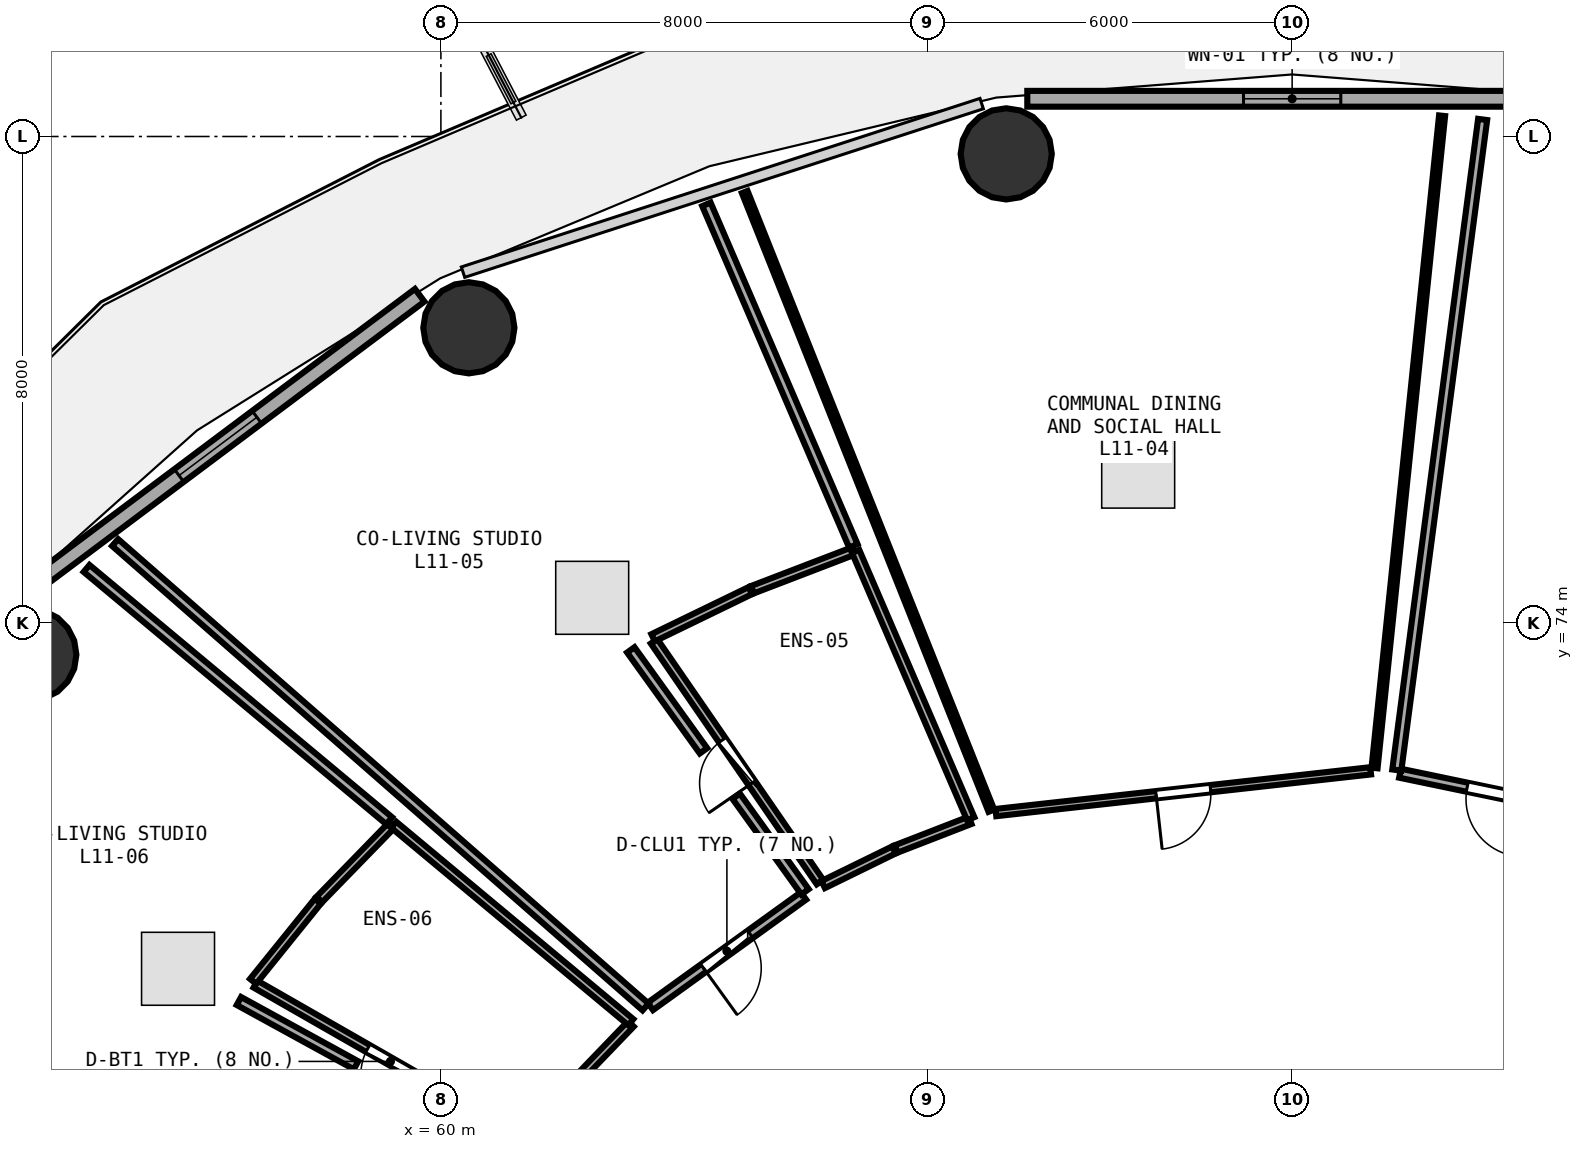
"""IFC4 building model, lengths in metres.
Left out: names, types, materials, properties, quantities, classifications, styles, units other than length and angle.
Written with IfcOpenShell. Run it as: python <this file> out.ifc"""

import sys

from ifc_helpers import new_model, si_unit, direction, frame, frame_2d, origin, origin_2d, place, context, subcontext, project, spatial, rectangle, circle, extrude, element, fill, save


model = new_model("IFC4")
c1 = context("Model", 3, precision=1e-05, world=origin(), true_north=direction((0.0, 1.0)))
c2 = subcontext(c1, "Body", "Model", "MODEL_VIEW")
j1 = project(units=[si_unit("LENGTHUNIT", "METRE"), si_unit("PLANEANGLEUNIT", "RADIAN")], contexts=[c1])
p1 = place(None, origin())
s1 = spatial("IfcSite", under=j1, at=p1, CompositionType="ELEMENT")
p2 = place(p1, origin())
s2 = spatial("IfcBuilding", under=s1, at=p2, CompositionType="ELEMENT")
p3 = place(p2, frame((0.0, 0.0, 45.0)))
s3 = spatial("IfcBuildingStorey", under=s2, at=p3, CompositionType="ELEMENT", Elevation=45.0)
for number, where, z_axis, x_axis in (
    (1, (69.298, 81.714, 0.0), (0.0, 0.0, 1.0), (1.0, 0.0, 0.0)),
    (2, (60.46, 78.854, 0.0), (0.0, 0.0, 1.0), (1.0, 0.0, 0.0)),
    (3, (53.256, 73.478, 0.0), (0.0, 0.0, 1.0), (1.0, 0.0, 0.0)),
):
    element("IfcColumn", number, at=place(p3, frame(where, z_axis=z_axis, x_axis=x_axis)), inside=s3, PredefinedType="COLUMN", context=c2, shape_type="SweptSolid", body=[
        extrude(circle(Radius=0.75, at=origin_2d()), origin(), (0.0, 0.0, 1.0), 3.75),
    ])
p4 = place(p3, frame((78.356, 82.62, 0.0), z_axis=(0.0, 0.0, 1.0), x_axis=(-1.0, 0.0, 0.0)))
e4 = element("IfcWall", 4, at=p4, inside=s3, PredefinedType="SOLIDWALL", context=c2, shape_type="SweptSolid", body=[
    extrude(rectangle(XDim=8.712, YDim=0.26, at=frame_2d((4.356, 0.0))), origin(), (0.0, 0.0, 1.0), 3.475),
])
p5 = place(p4, frame((3.556, 0.0, 0.85)))
e5 = element("IfcOpeningElement", 5, at=p5, cuts=e4, PredefinedType="OPENING", context=c2, shape_type="SweptSolid", body=[
    extrude(rectangle(XDim=1.6, YDim=1.45, at=frame_2d((0.8, 0.725))), frame((0.0, 0.14, 0.0), z_axis=(0.0, -1.0, 0.0), x_axis=(1.0, 0.0, 0.0)), (0.0, 0.0, 1.0), 0.28),
])
p6 = place(p3, frame((59.651, 79.389, 0.0), z_axis=(0.0, 0.0, 1.0), x_axis=(-0.80030733173, -0.599590005569, 0.0)))
e6 = element("IfcWall", 6, at=p6, inside=s3, PredefinedType="SOLIDWALL", context=c2, shape_type="SweptSolid", body=[
    extrude(rectangle(XDim=8.291, YDim=0.26, at=frame_2d((4.145, 0.0))), origin(), (0.0, 0.0, 1.0), 3.475),
])
p7 = place(p6, frame((3.345, 0.0, 0.85)))
e7 = element("IfcOpeningElement", 7, at=p7, cuts=e6, PredefinedType="OPENING", context=c2, shape_type="SweptSolid", body=[
    extrude(rectangle(XDim=1.6, YDim=1.45, at=frame_2d((0.8, 0.725))), frame((0.0, 0.14, 0.0), z_axis=(0.0, -1.0, 0.0), x_axis=(1.0, 0.0, 0.0)), (0.0, 0.0, 1.0), 0.28),
])
p8 = place(p3, frame((78.914, 70.874, 0.0), z_axis=(0.0, 0.0, 1.0), x_axis=(-0.978952544969, 0.204088007237, 0.0)))
e8 = element("IfcWall", 8, at=p8, inside=s3, PredefinedType="PARTITIONING", context=c2, shape_type="SweptSolid", body=[
    extrude(rectangle(XDim=3.207, YDim=0.15, at=frame_2d((1.604, 0.0))), origin(), (0.0, 0.0, 1.0), 3.235),
])
p9 = place(p8, frame((1.129, 0.0, 0.0)))
e9 = element("IfcOpeningElement", 9, at=p9, cuts=e8, PredefinedType="OPENING", context=c2, shape_type="SweptSolid", body=[
    extrude(rectangle(XDim=0.95, YDim=2.08, at=frame_2d((0.475, 1.04))), frame((0.0, 0.085, 0.0), z_axis=(0.0, -1.0, 0.0), x_axis=(1.0, 0.0, 0.0)), (0.0, 0.0, 1.0), 0.17),
])
p10 = place(p3, frame((75.292, 71.568, 0.0), z_axis=(0.0, 0.0, 1.0), x_axis=(-0.993850084324, -0.110733959964, 0.0)))
e10 = element("IfcWall", 10, at=p10, inside=s3, PredefinedType="PARTITIONING", context=c2, shape_type="SweptSolid", body=[
    extrude(rectangle(XDim=6.202, YDim=0.12, at=frame_2d((3.101, 0.0))), origin(), (0.0, 0.0, 1.0), 2.875),
])
p11 = place(p10, frame((2.651, 0.0, 0.0)))
e11 = element("IfcOpeningElement", 11, at=p11, cuts=e10, PredefinedType="OPENING", context=c2, shape_type="SweptSolid", body=[
    extrude(rectangle(XDim=0.9, YDim=2.08, at=frame_2d((0.45, 1.04))), frame((0.0, 0.07, 0.0), z_axis=(0.0, -1.0, 0.0), x_axis=(1.0, 0.0, 0.0)), (0.0, 0.0, 1.0), 0.14),
])
p12 = place(p3, frame((66.235, 69.738, 0.0), z_axis=(0.0, 0.0, 1.0), x_axis=(-0.567426867042, 0.823423797664, 0.0)))
e12 = element("IfcWall", 12, at=p12, inside=s3, PredefinedType="PLUMBINGWALL", context=c2, shape_type="SweptSolid", body=[
    extrude(rectangle(XDim=4.809, YDim=0.13, at=frame_2d((2.405, 0.0))), origin(), (0.0, 0.0, 1.0), 3.175),
])
p13 = place(p12, frame((1.975, 0.0, 0.0)))
e13 = element("IfcOpeningElement", 13, at=p13, cuts=e12, PredefinedType="OPENING", context=c2, shape_type="SweptSolid", body=[
    extrude(rectangle(XDim=0.86, YDim=2.05, at=frame_2d((0.43, 1.025))), frame((0.0, 0.075, 0.0), z_axis=(0.0, -1.0, 0.0), x_axis=(1.0, 0.0, 0.0)), (0.0, 0.0, 1.0), 0.15),
])
p14 = place(p3, frame((65.963, 69.511, 0.0), z_axis=(0.0, 0.0, 1.0), x_axis=(-0.811021116066, -0.585016879496, 0.0)))
e14 = element("IfcWall", 14, at=p14, inside=s3, PredefinedType="PARTITIONING", context=c2, shape_type="SweptSolid", body=[
    extrude(rectangle(XDim=3.106, YDim=0.15, at=frame_2d((1.553, 0.0))), origin(), (0.0, 0.0, 1.0), 2.875),
])
p15 = place(p14, frame((1.078, 0.0, 0.0)))
e15 = element("IfcOpeningElement", 15, at=p15, cuts=e14, PredefinedType="OPENING", context=c2, shape_type="SweptSolid", body=[
    extrude(rectangle(XDim=0.95, YDim=2.08, at=frame_2d((0.475, 1.04))), frame((0.0, 0.085, 0.0), z_axis=(0.0, -1.0, 0.0), x_axis=(1.0, 0.0, 0.0)), (0.0, 0.0, 1.0), 0.17),
])
p16 = place(p3, frame((61.39, 65.519, 0.0), z_axis=(0.0, 0.0, 1.0), x_axis=(-0.867813964862, 0.496889245598, 0.0)))
e16 = element("IfcWall", 16, at=p16, inside=s3, PredefinedType="PLUMBINGWALL", context=c2, shape_type="SweptSolid", body=[
    extrude(rectangle(XDim=5.115, YDim=0.13, at=frame_2d((2.557, 0.0))), origin(), (0.0, 0.0, 1.0), 2.875),
])
p17 = place(p16, frame((2.127, 0.0, 0.0)))
e17 = element("IfcOpeningElement", 17, at=p17, cuts=e16, PredefinedType="OPENING", context=c2, shape_type="SweptSolid", body=[
    extrude(rectangle(XDim=0.86, YDim=2.05, at=frame_2d((0.43, 1.025))), frame((0.0, 0.075, 0.0), z_axis=(0.0, -1.0, 0.0), x_axis=(1.0, 0.0, 0.0)), (0.0, 0.0, 1.0), 0.15),
])
p18 = place(p3, frame((75.721, 71.581, 0.0), z_axis=(0.0, 0.0, 1.0), x_axis=(0.130800348515, 0.991408729449, 0.0)))
e18 = element("IfcWall", 18, at=p18, inside=s3, PredefinedType="PARTITIONING", context=c2, shape_type="SweptSolid", body=[
    extrude(rectangle(XDim=10.792, YDim=0.15, at=frame_2d((5.396, 0.0))), origin(), (0.0, 0.0, 1.0), 2.875),
])
p19 = place(p3, frame((69.053, 70.912, 0.0), z_axis=(0.0, 0.0, 1.0), x_axis=(-0.370325956987, 0.928901870803, 0.0)))
e19 = element("IfcWall", 19, at=p19, inside=s3, PredefinedType="PARTITIONING", context=c2, shape_type="SweptSolid", body=[
    extrude(rectangle(XDim=10.954, YDim=0.1, at=frame_2d((5.477, 0.0))), origin(), (0.0, 0.0, 1.0), 2.875),
])
p20 = place(p3, frame((76.466, 82.341, 0.0), z_axis=(0.0, 0.0, 1.0), x_axis=(-0.103008831227, -0.994680441493, 0.0)))
e20 = element("IfcWall", 20, at=p20, inside=s3, PredefinedType="PARTITIONING", context=c2, shape_type="SweptSolid", body=[
    extrude(rectangle(XDim=10.784, YDim=0.1, at=frame_2d((5.392, 0.0))), origin(), (0.0, 0.0, 1.0), 2.875),
])
p21 = place(p3, frame((68.703, 70.755, 0.0), z_axis=(0.0, 0.0, 1.0), x_axis=(-0.932299479839, -0.361687268082, 0.0)))
e21 = element("IfcWall", 21, at=p21, inside=s3, PredefinedType="PLUMBINGWALL", context=c2, shape_type="SweptSolid", body=[
    extrude(rectangle(XDim=1.304, YDim=0.13, at=frame_2d((0.652, 0.0))), origin(), (0.0, 0.0, 1.0), 3.48),
])
p22 = place(p3, frame((67.451, 70.267, 0.0), z_axis=(0.0, 0.0, 1.0), x_axis=(-0.898275282077, -0.439433177639, 0.0)))
e22 = element("IfcWall", 22, at=p22, inside=s3, PredefinedType="PLUMBINGWALL", context=c2, shape_type="SweptSolid", body=[
    extrude(rectangle(XDim=1.296, YDim=0.13, at=frame_2d((0.648, 0.0))), origin(), (0.0, 0.0, 1.0), 3.48),
])
p23 = place(p3, frame((63.49, 73.757, 0.0), z_axis=(0.0, 0.0, 1.0), x_axis=(0.899832096889, 0.436236400829, 0.0)))
e23 = element("IfcWall", 23, at=p23, inside=s3, PredefinedType="PLUMBINGWALL", context=c2, shape_type="SweptSolid", body=[
    extrude(rectangle(XDim=1.776, YDim=0.13, at=frame_2d((0.888, 0.0))), origin(), (0.0, 0.0, 1.0), 3.48),
])
p24 = place(p3, frame((65.125, 74.547, 0.0), z_axis=(0.0, 0.0, 1.0), x_axis=(0.93361980904, 0.35826533766, 0.0)))
e24 = element("IfcWall", 24, at=p24, inside=s3, PredefinedType="PLUMBINGWALL", context=c2, shape_type="SweptSolid", body=[
    extrude(rectangle(XDim=1.788, YDim=0.13, at=frame_2d((0.894, 0.0))), origin(), (0.0, 0.0, 1.0), 3.48),
])
p25 = place(p3, frame((66.821, 75.177, 0.0), z_axis=(0.0, 0.0, 1.0), x_axis=(0.395562338017, -0.918439130668, 0.0)))
e25 = element("IfcWall", 25, at=p25, inside=s3, PredefinedType="PLUMBINGWALL", context=c2, shape_type="SweptSolid", body=[
    extrude(rectangle(XDim=4.786, YDim=0.13, at=frame_2d((2.393, 0.0))), origin(), (0.0, 0.0, 1.0), 3.175),
])
p26 = place(p3, frame((63.366, 67.685, 0.0), z_axis=(0.0, 0.0, 1.0), x_axis=(-0.752403187404, 0.658702849231, 0.0)))
e26 = element("IfcWall", 26, at=p26, inside=s3, PredefinedType="PARTITIONING", context=c2, shape_type="SweptSolid", body=[
    extrude(rectangle(XDim=11.595, YDim=0.15, at=frame_2d((5.797, 0.0))), origin(), (0.0, 0.0, 1.0), 2.875),
])
p27 = place(p3, frame((64.367, 80.884, 0.0), z_axis=(0.0, 0.0, 1.0), x_axis=(0.395282873179, -0.918559442917, 0.0)))
e27 = element("IfcWall", 27, at=p27, inside=s3, PredefinedType="PARTITIONING", context=c2, shape_type="SweptSolid", body=[
    extrude(rectangle(XDim=6.113, YDim=0.15, at=frame_2d((3.057, 0.0))), origin(), (0.0, 0.0, 1.0), 2.875),
])
p28 = place(p3, frame((63.123, 73.558, 0.0), z_axis=(0.0, 0.0, 1.0), x_axis=(0.58432672942, -0.811518498425, 0.0)))
e28 = element("IfcWall", 28, at=p28, inside=s3, PredefinedType="PARTITIONING", context=c2, shape_type="SweptSolid", body=[
    extrude(rectangle(XDim=2.046, YDim=0.15, at=frame_2d((1.023, 0.0))), origin(), (0.0, 0.0, 1.0), 3.175),
])
p29 = place(p3, frame((64.857, 71.151, 0.0), z_axis=(0.0, 0.0, 1.0), x_axis=(0.584298085417, -0.811539122519, 0.0)))
e29 = element("IfcWall", 29, at=p29, inside=s3, PredefinedType="PARTITIONING", context=c2, shape_type="SweptSolid", body=[
    extrude(rectangle(XDim=1.937, YDim=0.15, at=frame_2d((0.969, 0.0))), origin(), (0.0, 0.0, 1.0), 3.235),
])
p30 = place(p3, frame((63.125, 67.408, 0.0), z_axis=(0.0, 0.0, 1.0), x_axis=(-0.693342211096, -0.720608477824, 0.0)))
e30 = element("IfcWall", 30, at=p30, inside=s3, PredefinedType="PLUMBINGWALL", context=c2, shape_type="SweptSolid", body=[
    extrude(rectangle(XDim=1.254, YDim=0.13, at=frame_2d((0.627, 0.0))), origin(), (0.0, 0.0, 1.0), 2.875),
])
p31 = place(p3, frame((56.912, 68.106, 0.0), z_axis=(0.0, 0.0, 1.0), x_axis=(0.628152519701, 0.778090233837, 0.0)))
e31 = element("IfcWall", 31, at=p31, inside=s3, PredefinedType="PLUMBINGWALL", context=c2, shape_type="SweptSolid", body=[
    extrude(rectangle(XDim=1.693, YDim=0.13, at=frame_2d((0.847, 0.0))), origin(), (0.0, 0.0, 1.0), 3.175),
])
p32 = place(p3, frame((58.002, 69.453, 0.0), z_axis=(0.0, 0.0, 1.0), x_axis=(0.697337129747, 0.716743278641, 0.0)))
e32 = element("IfcWall", 32, at=p32, inside=s3, PredefinedType="PLUMBINGWALL", context=c2, shape_type="SweptSolid", body=[
    extrude(rectangle(XDim=1.711, YDim=0.13, at=frame_2d((0.855, 0.0))), origin(), (0.0, 0.0, 1.0), 2.875),
])
p33 = place(p3, frame((59.224, 70.681, 0.0), z_axis=(0.0, 0.0, 1.0), x_axis=(0.768509127281, -0.63983882446, 0.0)))
e33 = element("IfcWall", 33, at=p33, inside=s3, PredefinedType="PLUMBINGWALL", context=c2, shape_type="SweptSolid", body=[
    extrude(rectangle(XDim=5.074, YDim=0.13, at=frame_2d((2.537, 0.0))), origin(), (0.0, 0.0, 1.0), 3.175),
])
p34 = place(p3, frame((54.173, 74.896, 0.0), z_axis=(0.0, 0.0, 1.0), x_axis=(0.768100814479, -0.640328930157, 0.0)))
e34 = element("IfcWall", 34, at=p34, inside=s3, PredefinedType="PARTITIONING", context=c2, shape_type="SweptSolid", body=[
    extrude(rectangle(XDim=6.479, YDim=0.15, at=frame_2d((3.24, 0.0))), origin(), (0.0, 0.0, 1.0), 2.875),
])
p35 = place(p3, frame((56.678, 67.783, 0.0), z_axis=(0.0, 0.0, 1.0), x_axis=(0.876780673324, -0.480890477017, 0.0)))
e35 = element("IfcWall", 35, at=p35, inside=s3, PredefinedType="PARTITIONING", context=c2, shape_type="SweptSolid", body=[
    extrude(rectangle(XDim=2.197, YDim=0.15, at=frame_2d((1.099, 0.0))), origin(), (0.0, 0.0, 1.0), 3.175),
])
p36 = place(p5, origin())
e36 = element("IfcWindow", 36, at=p36, inside=s3, PartitioningType="SINGLE_PANEL", PredefinedType="WINDOW", context=c2, shape_type="SweptSolid", body=[
    extrude(rectangle(XDim=1.6, YDim=1.45, at=frame_2d((0.8, 0.725))), frame((0.0, 0.03, 0.0), z_axis=(0.0, -1.0, 0.0), x_axis=(1.0, 0.0, 0.0)), (0.0, 0.0, 1.0), 0.06),
])
fill(e5, e36)
p37 = place(p7, origin())
e37 = element("IfcWindow", 37, at=p37, inside=s3, PartitioningType="SINGLE_PANEL", PredefinedType="WINDOW", context=c2, shape_type="SweptSolid", body=[
    extrude(rectangle(XDim=1.6, YDim=1.45, at=frame_2d((0.8, 0.725))), frame((0.0, 0.03, 0.0), z_axis=(0.0, -1.0, 0.0), x_axis=(1.0, 0.0, 0.0)), (0.0, 0.0, 1.0), 0.06),
])
fill(e7, e37)
p38 = place(p9, origin())
e38 = element("IfcDoor", 38, at=p38, inside=s3, OperationType="SINGLE_SWING_LEFT", PredefinedType="DOOR", context=c2, shape_type="SweptSolid", body=[
    extrude(rectangle(XDim=0.95, YDim=2.08, at=frame_2d((0.475, 1.04))), frame((0.0, 0.025, 0.0), z_axis=(0.0, -1.0, 0.0), x_axis=(1.0, 0.0, 0.0)), (0.0, 0.0, 1.0), 0.05),
])
fill(e9, e38)
p39 = place(p11, origin())
e39 = element("IfcDoor", 39, at=p39, inside=s3, OperationType="SINGLE_SWING_RIGHT", PredefinedType="DOOR", context=c2, shape_type="SweptSolid", body=[
    extrude(rectangle(XDim=0.9, YDim=2.08, at=frame_2d((0.45, 1.04))), frame((0.0, 0.025, 0.0), z_axis=(0.0, -1.0, 0.0), x_axis=(1.0, 0.0, 0.0)), (0.0, 0.0, 1.0), 0.05),
])
fill(e11, e39)
p40 = place(p13, origin())
e40 = element("IfcDoor", 40, at=p40, inside=s3, OperationType="SINGLE_SWING_LEFT", PredefinedType="DOOR", context=c2, shape_type="SweptSolid", body=[
    extrude(rectangle(XDim=0.86, YDim=2.05, at=frame_2d((0.43, 1.025))), frame((0.0, 0.025, 0.0), z_axis=(0.0, -1.0, 0.0), x_axis=(1.0, 0.0, 0.0)), (0.0, 0.0, 1.0), 0.05),
])
fill(e13, e40)
p41 = place(p15, origin())
e41 = element("IfcDoor", 41, at=p41, inside=s3, OperationType="SINGLE_SWING_RIGHT", PredefinedType="DOOR", context=c2, shape_type="SweptSolid", body=[
    extrude(rectangle(XDim=0.95, YDim=2.08, at=frame_2d((0.475, 1.04))), frame((0.0, 0.025, 0.0), z_axis=(0.0, -1.0, 0.0), x_axis=(1.0, 0.0, 0.0)), (0.0, 0.0, 1.0), 0.05),
])
fill(e15, e41)
p42 = place(p17, origin())
e42 = element("IfcDoor", 42, at=p42, inside=s3, OperationType="SINGLE_SWING_LEFT", PredefinedType="DOOR", context=c2, shape_type="SweptSolid", body=[
    extrude(rectangle(XDim=0.86, YDim=2.05, at=frame_2d((0.43, 1.025))), frame((0.0, 0.025, 0.0), z_axis=(0.0, -1.0, 0.0), x_axis=(1.0, 0.0, 0.0)), (0.0, 0.0, 1.0), 0.05),
])
fill(e17, e42)
save(model, sys.argv[1])
